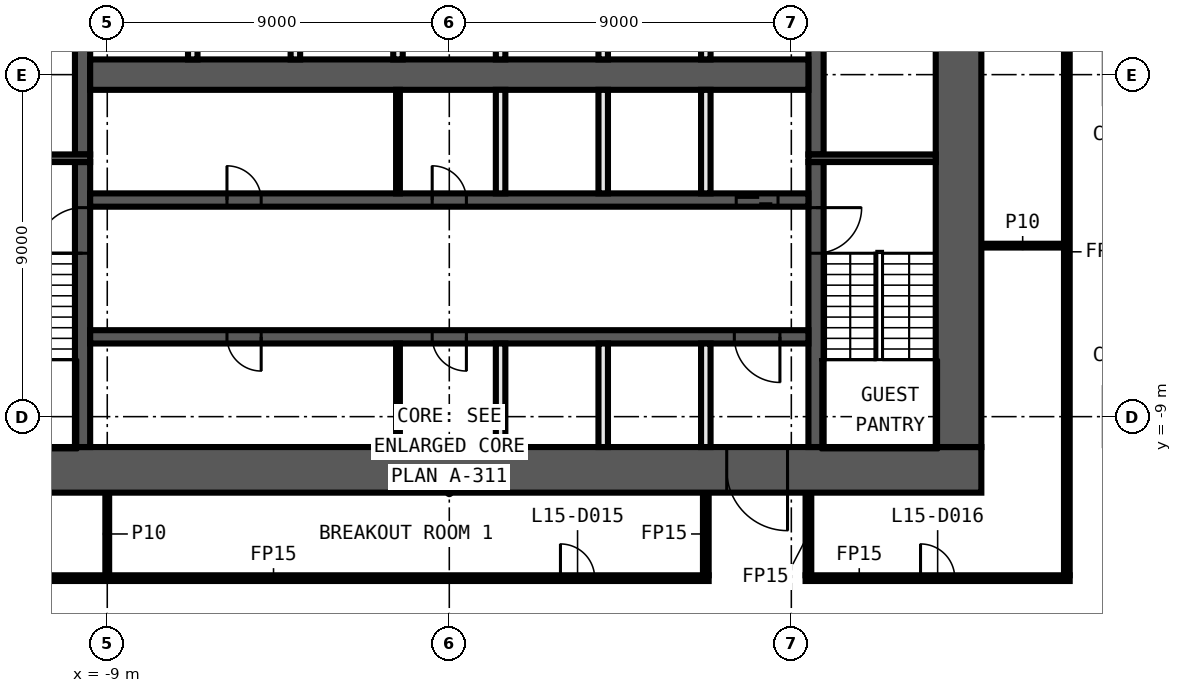
"""IFC4 building model, lengths in metres.
Left out: names, types, materials, properties, quantities, classifications, styles, units other than length and angle.
Written with IfcOpenShell. Run it as: python <this file> out.ifc"""

import sys

from ifc_helpers import new_model, si_unit, direction, frame, frame_2d, origin, place, context, subcontext, project, spatial, rectangle, extrude, element, fill, save


model = new_model("IFC4")
c1 = context("Model", 3, precision=1e-05, world=origin(), true_north=direction((0.0, 1.0)))
c2 = subcontext(c1, "Body", "Model", "MODEL_VIEW")
j1 = project(units=[si_unit("LENGTHUNIT", "METRE"), si_unit("PLANEANGLEUNIT", "RADIAN")], contexts=[c1])
p1 = place(None, origin())
s1 = spatial("IfcSite", under=j1, at=p1, CompositionType="ELEMENT")
p2 = place(p1, origin())
s2 = spatial("IfcBuilding", under=s1, at=p2, CompositionType="ELEMENT")
p3 = place(p2, frame((0.0, 0.0, 77.3)))
s3 = spatial("IfcBuildingStorey", under=s2, at=p3, CompositionType="ELEMENT", Elevation=77.3)
p4 = place(p3, frame((-16.325, -13.25, 0.0), z_axis=(0.0, 0.0, 1.0), x_axis=(1.0, 0.0, 0.0)))
e1 = element("IfcWall", 1, at=p4, inside=s3, PredefinedType="PARTITIONING", context=c2, shape_type="SweptSolid", body=[
    extrude(rectangle(XDim=23.15, YDim=0.15, at=frame_2d((11.575, 0.0))), origin(), (0.0, 0.0, 1.0), 3.3),
])
p5 = place(p4, frame((3.25, 0.0, 0.0)))
e2 = element("IfcOpeningElement", 2, at=p5, cuts=e1, PredefinedType="OPENING", context=c2, shape_type="SweptSolid", body=[
    extrude(rectangle(XDim=0.9, YDim=2.1, at=frame_2d((0.45, 1.05))), frame((0.0, 0.085, 0.0), z_axis=(0.0, -1.0, 0.0), x_axis=(1.0, 0.0, 0.0)), (0.0, 0.0, 1.0), 0.17),
])
p6 = place(p4, frame((19.25, 0.0, 0.0)))
e3 = element("IfcOpeningElement", 3, at=p6, cuts=e1, PredefinedType="OPENING", context=c2, shape_type="SweptSolid", body=[
    extrude(rectangle(XDim=0.9, YDim=2.1, at=frame_2d((0.45, 1.05))), frame((0.0, 0.085, 0.0), z_axis=(0.0, -1.0, 0.0), x_axis=(1.0, 0.0, 0.0)), (0.0, 0.0, 1.0), 0.17),
])
p7 = place(p3, frame((9.375, -13.25, 0.0), z_axis=(0.0, 0.0, 1.0), x_axis=(1.0, 0.0, 0.0)))
e4 = element("IfcWall", 4, at=p7, inside=s3, PredefinedType="PARTITIONING", context=c2, shape_type="SweptSolid", body=[
    extrude(rectangle(XDim=6.95, YDim=0.15, at=frame_2d((3.475, 0.0))), origin(), (0.0, 0.0, 1.0), 3.3),
])
p8 = place(p7, frame((3.025, 0.0, 0.0)))
e5 = element("IfcOpeningElement", 5, at=p8, cuts=e4, PredefinedType="OPENING", context=c2, shape_type="SweptSolid", body=[
    extrude(rectangle(XDim=0.9, YDim=2.1, at=frame_2d((0.45, 1.05))), frame((0.0, 0.085, 0.0), z_axis=(0.0, -1.0, 0.0), x_axis=(1.0, 0.0, 0.0)), (0.0, 0.0, 1.0), 0.17),
])
p9 = place(p3, frame((14.0, -4.5, 0.0), z_axis=(0.0, 0.0, 1.0), x_axis=(1.0, 0.0, 0.0)))
e6 = element("IfcWall", 6, at=p9, inside=s3, PredefinedType="PARTITIONING", context=c2, shape_type="SweptSolid", body=[
    extrude(rectangle(XDim=2.175, YDim=0.1, at=frame_2d((1.087, 0.0))), origin(), (0.0, 0.0, 1.0), 3.3),
])
p10 = place(p3, frame((16.25, -13.175, 0.0), z_axis=(0.0, 0.0, 1.0), x_axis=(0.0, 1.0, 0.0)))
e7 = element("IfcWall", 7, at=p10, inside=s3, PredefinedType="PARTITIONING", context=c2, shape_type="SweptSolid", body=[
    extrude(rectangle(XDim=26.35, YDim=0.15, at=frame_2d((13.175, 0.0))), origin(), (0.0, 0.0, 1.0), 3.3),
])
p11 = place(p10, frame((17.225, 0.0, 0.0)))
e8 = element("IfcOpeningElement", 8, at=p11, cuts=e7, PredefinedType="OPENING", context=c2, shape_type="SweptSolid", body=[
    extrude(rectangle(XDim=0.9, YDim=2.1, at=frame_2d((0.45, 1.05))), frame((0.0, 0.085, 0.0), z_axis=(0.0, -1.0, 0.0), x_axis=(1.0, 0.0, 0.0)), (0.0, 0.0, 1.0), 0.17),
])
for number, where, z_axis, x_axis in (
    (9, (9.45, -13.175, 0.0), (0.0, 0.0, 1.0), (0.0, 1.0, 0.0)),
    (10, (6.75, -13.175, 0.0), (0.0, 0.0, 1.0), (0.0, 1.0, 0.0)),
):
    element("IfcWall", number, at=place(p3, frame(where, z_axis=z_axis, x_axis=x_axis)), inside=s3, PredefinedType="PARTITIONING", context=c2, shape_type="SweptSolid", body=[
        extrude(rectangle(XDim=2.175, YDim=0.15, at=frame_2d((1.087, 0.0))), origin(), (0.0, 0.0, 1.0), 3.3),
    ])
p12 = place(p3, frame((-9.0, -13.175, 0.0), z_axis=(0.0, 0.0, 1.0), x_axis=(0.0, 1.0, 0.0)))
e11 = element("IfcWall", 11, at=p12, inside=s3, PredefinedType="PARTITIONING", context=c2, shape_type="SweptSolid", body=[
    extrude(rectangle(XDim=2.175, YDim=0.1, at=frame_2d((1.087, 0.0))), origin(), (0.0, 0.0, 1.0), 3.3),
])
p13 = place(p3, frame((14.0, -10.4, 0.0), z_axis=(0.0, 0.0, 1.0), x_axis=(-1.0, 0.0, 0.0)))
e12 = element("IfcWall", 12, at=p13, inside=s3, PredefinedType="SHEAR", context=c2, shape_type="SweptSolid", body=[
    extrude(rectangle(XDim=28.0, YDim=1.2, at=frame_2d((14.0, 0.0))), origin(), (0.0, 0.0, 1.0), 3.3),
])
p14 = place(p13, frame((5.1, 0.0, 0.0)))
e13 = element("IfcOpeningElement", 13, at=p14, cuts=e12, PredefinedType="OPENING", context=c2, shape_type="SweptSolid", body=[
    extrude(rectangle(XDim=1.6, YDim=2.1, at=frame_2d((0.8, 1.05))), frame((0.0, 0.61, 0.0), z_axis=(0.0, -1.0, 0.0), x_axis=(1.0, 0.0, 0.0)), (0.0, 0.0, 1.0), 1.22),
])
p15 = place(p3, frame((13.4, 9.8, 0.0), z_axis=(0.0, 0.0, 1.0), x_axis=(0.0, -1.0, 0.0)))
e14 = element("IfcWall", 14, at=p15, inside=s3, PredefinedType="SHEAR", context=c2, shape_type="SweptSolid", body=[
    extrude(rectangle(XDim=19.6, YDim=1.2, at=frame_2d((9.8, 0.0))), origin(), (0.0, 0.0, 1.0), 3.3),
])
p16 = place(p3, frame((9.65, -2.3, 0.0), z_axis=(0.0, 0.0, 1.0), x_axis=(0.0, -1.0, 0.0)))
e15 = element("IfcWall", 15, at=p16, inside=s3, PredefinedType="SHEAR", context=c2, shape_type="SweptSolid", body=[
    extrude(rectangle(XDim=7.5, YDim=0.4, at=frame_2d((3.75, 0.0))), origin(), (0.0, 0.0, 1.0), 3.3),
])
p17 = place(p16, frame((1.2, 0.0, 0.0)))
e16 = element("IfcOpeningElement", 16, at=p17, cuts=e15, PredefinedType="OPENING", context=c2, shape_type="SweptSolid", body=[
    extrude(rectangle(XDim=1.2, YDim=2.1, at=frame_2d((0.6, 1.05))), frame((0.0, 0.21, 0.0), z_axis=(0.0, -1.0, 0.0), x_axis=(1.0, 0.0, 0.0)), (0.0, 0.0, 1.0), 0.42),
])
p18 = place(p3, frame((9.65, 2.1, 0.0), z_axis=(0.0, 0.0, 1.0), x_axis=(0.0, -1.0, 0.0)))
e17 = element("IfcWall", 17, at=p18, inside=s3, PredefinedType="SHEAR", context=c2, shape_type="SweptSolid", body=[
    extrude(rectangle(XDim=4.2, YDim=0.4, at=frame_2d((2.1, 0.0))), origin(), (0.0, 0.0, 1.0), 3.3),
])
p19 = place(p18, frame((0.15, 0.0, 0.0)))
e18 = element("IfcOpeningElement", 18, at=p19, cuts=e17, PredefinedType="OPENING", context=c2, shape_type="SweptSolid", body=[
    extrude(rectangle(XDim=0.9, YDim=2.1, at=frame_2d((0.45, 1.05))), frame((0.0, 0.21, 0.0), z_axis=(0.0, -1.0, 0.0), x_axis=(1.0, 0.0, 0.0)), (0.0, 0.0, 1.0), 0.42),
])
p20 = place(p3, frame((-9.65, -9.8, 0.0), z_axis=(0.0, 0.0, 1.0), x_axis=(0.0, 1.0, 0.0)))
e19 = element("IfcWall", 19, at=p20, inside=s3, PredefinedType="SHEAR", context=c2, shape_type="SweptSolid", body=[
    extrude(rectangle(XDim=7.5, YDim=0.4, at=frame_2d((3.75, 0.0))), origin(), (0.0, 0.0, 1.0), 3.3),
])
p21 = place(p20, frame((5.1, 0.0, 0.0)))
e20 = element("IfcOpeningElement", 20, at=p21, cuts=e19, PredefinedType="OPENING", context=c2, shape_type="SweptSolid", body=[
    extrude(rectangle(XDim=1.2, YDim=2.1, at=frame_2d((0.6, 1.05))), frame((0.0, 0.21, 0.0), z_axis=(0.0, -1.0, 0.0), x_axis=(1.0, 0.0, 0.0)), (0.0, 0.0, 1.0), 0.42),
])
p22 = place(p3, frame((-9.65, -2.1, 0.0), z_axis=(0.0, 0.0, 1.0), x_axis=(0.0, 1.0, 0.0)))
e21 = element("IfcWall", 21, at=p22, inside=s3, PredefinedType="SHEAR", context=c2, shape_type="SweptSolid", body=[
    extrude(rectangle(XDim=4.2, YDim=0.4, at=frame_2d((2.1, 0.0))), origin(), (0.0, 0.0, 1.0), 3.3),
])
for number, where, z_axis, x_axis in (
    (22, (9.45, -2.2, 0.0), (0.0, 0.0, 1.0), (1.0, 0.0, 0.0)),
    (23, (-9.45, -2.2, 0.0), (0.0, 0.0, 1.0), (-1.0, 0.0, 0.0)),
):
    element("IfcWall", number, at=place(p3, frame(where, z_axis=z_axis, x_axis=x_axis)), inside=s3, PredefinedType="SHEAR", context=c2, shape_type="SweptSolid", body=[
        extrude(rectangle(XDim=3.35, YDim=0.2, at=frame_2d((1.675, 0.0))), origin(), (0.0, 0.0, 1.0), 3.3),
    ])
p23 = place(p3, frame((-9.45, -3.3, 0.0), z_axis=(0.0, 0.0, 1.0), x_axis=(1.0, 0.0, 0.0)))
e24 = element("IfcWall", 24, at=p23, inside=s3, PredefinedType="SHEAR", context=c2, shape_type="SweptSolid", body=[
    extrude(rectangle(XDim=18.9, YDim=0.35, at=frame_2d((9.45, 0.0))), origin(), (0.0, 0.0, 1.0), 3.3),
])
p24 = place(p23, frame((17.0, 0.0, 0.0)))
e25 = element("IfcOpeningElement", 25, at=p24, cuts=e24, PredefinedType="OPENING", context=c2, shape_type="SweptSolid", body=[
    extrude(rectangle(XDim=1.1, YDim=2.1, at=frame_2d((0.55, 1.05))), frame((0.0, 0.185, 0.0), z_axis=(0.0, -1.0, 0.0), x_axis=(1.0, 0.0, 0.0)), (0.0, 0.0, 1.0), 0.37),
])
p25 = place(p23, frame((3.6, 0.0, 0.0)))
e26 = element("IfcOpeningElement", 26, at=p25, cuts=e24, PredefinedType="OPENING", context=c2, shape_type="SweptSolid", body=[
    extrude(rectangle(XDim=0.9, YDim=2.1, at=frame_2d((0.45, 1.05))), frame((0.0, 0.185, 0.0), z_axis=(0.0, -1.0, 0.0), x_axis=(1.0, 0.0, 0.0)), (0.0, 0.0, 1.0), 0.37),
])
p26 = place(p23, frame((9.0, 0.0, 0.0)))
e27 = element("IfcOpeningElement", 27, at=p26, cuts=e24, PredefinedType="OPENING", context=c2, shape_type="SweptSolid", body=[
    extrude(rectangle(XDim=0.9, YDim=2.1, at=frame_2d((0.45, 1.05))), frame((0.0, 0.185, 0.0), z_axis=(0.0, -1.0, 0.0), x_axis=(1.0, 0.0, 0.0)), (0.0, 0.0, 1.0), 0.37),
])
p27 = place(p3, frame((9.45, -6.9, 0.0), z_axis=(0.0, 0.0, 1.0), x_axis=(-1.0, 0.0, 0.0)))
e28 = element("IfcWall", 28, at=p27, inside=s3, PredefinedType="SHEAR", context=c2, shape_type="SweptSolid", body=[
    extrude(rectangle(XDim=18.9, YDim=0.35, at=frame_2d((9.45, 0.0))), origin(), (0.0, 0.0, 1.0), 3.3),
])
p28 = place(p27, frame((0.75, 0.0, 0.0)))
e29 = element("IfcOpeningElement", 29, at=p28, cuts=e28, PredefinedType="OPENING", context=c2, shape_type="SweptSolid", body=[
    extrude(rectangle(XDim=1.2, YDim=2.1, at=frame_2d((0.6, 1.05))), frame((0.0, 0.185, 0.0), z_axis=(0.0, -1.0, 0.0), x_axis=(1.0, 0.0, 0.0)), (0.0, 0.0, 1.0), 0.37),
])
p29 = place(p27, frame((14.4, 0.0, 0.0)))
e30 = element("IfcOpeningElement", 30, at=p29, cuts=e28, PredefinedType="OPENING", context=c2, shape_type="SweptSolid", body=[
    extrude(rectangle(XDim=0.9, YDim=2.1, at=frame_2d((0.45, 1.05))), frame((0.0, 0.185, 0.0), z_axis=(0.0, -1.0, 0.0), x_axis=(1.0, 0.0, 0.0)), (0.0, 0.0, 1.0), 0.37),
])
p30 = place(p27, frame((9.0, 0.0, 0.0)))
e31 = element("IfcOpeningElement", 31, at=p30, cuts=e28, PredefinedType="OPENING", context=c2, shape_type="SweptSolid", body=[
    extrude(rectangle(XDim=0.9, YDim=2.1, at=frame_2d((0.45, 1.05))), frame((0.0, 0.185, 0.0), z_axis=(0.0, -1.0, 0.0), x_axis=(1.0, 0.0, 0.0)), (0.0, 0.0, 1.0), 0.37),
])
p31 = place(p3, frame((-9.45, 0.0, 0.0), z_axis=(0.0, 0.0, 1.0), x_axis=(1.0, 0.0, 0.0)))
e32 = element("IfcWall", 32, at=p31, inside=s3, PredefinedType="SHEAR", context=c2, shape_type="SweptSolid", body=[
    extrude(rectangle(XDim=18.9, YDim=0.8, at=frame_2d((9.45, 0.0))), origin(), (0.0, 0.0, 1.0), 3.3),
])
for number, where, z_axis, x_axis in (
    (33, (6.75, -9.8, 0.0), (0.0, 0.0, 1.0), (0.0, 1.0, 0.0)),
    (34, (6.75, -3.125, 0.0), (0.0, 0.0, 1.0), (0.0, 1.0, 0.0)),
    (35, (6.75, 0.4, 0.0), (0.0, 0.0, 1.0), (0.0, 1.0, 0.0)),
    (36, (4.05, -9.8, 0.0), (0.0, 0.0, 1.0), (0.0, 1.0, 0.0)),
    (37, (4.05, -3.125, 0.0), (0.0, 0.0, 1.0), (0.0, 1.0, 0.0)),
    (38, (4.05, 0.4, 0.0), (0.0, 0.0, 1.0), (0.0, 1.0, 0.0)),
    (39, (1.35, -9.8, 0.0), (0.0, 0.0, 1.0), (0.0, 1.0, 0.0)),
    (40, (1.35, -3.125, 0.0), (0.0, 0.0, 1.0), (0.0, 1.0, 0.0)),
    (41, (1.35, 0.4, 0.0), (0.0, 0.0, 1.0), (0.0, 1.0, 0.0)),
):
    element("IfcWall", number, at=place(p3, frame(where, z_axis=z_axis, x_axis=x_axis)), inside=s3, PredefinedType="SOLIDWALL", context=c2, shape_type="SweptSolid", body=[
        extrude(rectangle(XDim=2.725, YDim=0.25, at=frame_2d((1.363, 0.0))), origin(), (0.0, 0.0, 1.0), 3.3),
    ])
for number, where, z_axis, x_axis in (
    (42, (-1.35, -9.8, 0.0), (0.0, 0.0, 1.0), (0.0, 1.0, 0.0)),
    (43, (-1.35, -3.125, 0.0), (0.0, 0.0, 1.0), (0.0, 1.0, 0.0)),
):
    element("IfcWall", number, at=place(p3, frame(where, z_axis=z_axis, x_axis=x_axis)), inside=s3, PredefinedType="PARTITIONING", context=c2, shape_type="SweptSolid", body=[
        extrude(rectangle(XDim=2.725, YDim=0.1, at=frame_2d((1.363, 0.0))), origin(), (0.0, 0.0, 1.0), 3.3),
    ])
for number, where, z_axis, x_axis in (
    (44, (-1.35, 0.4, 0.0), (0.0, 0.0, 1.0), (0.0, 1.0, 0.0)),
    (45, (-4.05, 0.4, 0.0), (0.0, 0.0, 1.0), (0.0, 1.0, 0.0)),
    (46, (-6.75, 0.4, 0.0), (0.0, 0.0, 1.0), (0.0, 1.0, 0.0)),
):
    element("IfcWall", number, at=place(p3, frame(where, z_axis=z_axis, x_axis=x_axis)), inside=s3, PredefinedType="SOLIDWALL", context=c2, shape_type="SweptSolid", body=[
        extrude(rectangle(XDim=2.725, YDim=0.25, at=frame_2d((1.363, 0.0))), origin(), (0.0, 0.0, 1.0), 3.3),
    ])
p32 = place(p6, origin())
e47 = element("IfcDoor", 47, at=p32, inside=s3, OperationType="SINGLE_SWING_LEFT", PredefinedType="DOOR", context=c2, shape_type="SweptSolid", body=[
    extrude(rectangle(XDim=0.9, YDim=2.1, at=frame_2d((0.45, 1.05))), frame((0.0, 0.025, 0.0), z_axis=(0.0, -1.0, 0.0), x_axis=(1.0, 0.0, 0.0)), (0.0, 0.0, 1.0), 0.05),
])
fill(e3, e47)
p33 = place(p8, origin())
e48 = element("IfcDoor", 48, at=p33, inside=s3, OperationType="SINGLE_SWING_RIGHT", PredefinedType="DOOR", context=c2, shape_type="SweptSolid", body=[
    extrude(rectangle(XDim=0.9, YDim=2.1, at=frame_2d((0.45, 1.05))), frame((0.0, 0.025, 0.0), z_axis=(0.0, -1.0, 0.0), x_axis=(1.0, 0.0, 0.0)), (0.0, 0.0, 1.0), 0.05),
])
fill(e5, e48)
p34 = place(p24, origin())
e49 = element("IfcDoor", 49, at=p34, inside=s3, OperationType="DOUBLE_DOOR_SLIDING", PredefinedType="DOOR", context=c2, shape_type="SweptSolid", body=[
    extrude(rectangle(XDim=1.1, YDim=2.1, at=frame_2d((0.55, 1.05))), frame((0.0, 0.025, 0.0), z_axis=(0.0, -1.0, 0.0), x_axis=(1.0, 0.0, 0.0)), (0.0, 0.0, 1.0), 0.05),
])
fill(e25, e49)
p35 = place(p14, origin())
e50 = element("IfcDoor", 50, at=p35, inside=s3, OperationType="DOUBLE_DOOR_SINGLE_SWING", PredefinedType="DOOR", context=c2, shape_type="SweptSolid", body=[
    extrude(rectangle(XDim=1.6, YDim=2.1, at=frame_2d((0.8, 1.05))), frame((0.0, 0.025, 0.0), z_axis=(0.0, -1.0, 0.0), x_axis=(1.0, 0.0, 0.0)), (0.0, 0.0, 1.0), 0.05),
])
fill(e13, e50)
p36 = place(p28, origin())
e51 = element("IfcDoor", 51, at=p36, inside=s3, OperationType="SINGLE_SWING_LEFT", PredefinedType="DOOR", context=c2, shape_type="SweptSolid", body=[
    extrude(rectangle(XDim=1.2, YDim=2.1, at=frame_2d((0.6, 1.05))), frame((0.0, 0.025, 0.0), z_axis=(0.0, -1.0, 0.0), x_axis=(1.0, 0.0, 0.0)), (0.0, 0.0, 1.0), 0.05),
])
fill(e29, e51)
p37 = place(p25, origin())
e52 = element("IfcDoor", 52, at=p37, inside=s3, OperationType="SINGLE_SWING_RIGHT", PredefinedType="DOOR", context=c2, shape_type="SweptSolid", body=[
    extrude(rectangle(XDim=0.9, YDim=2.1, at=frame_2d((0.45, 1.05))), frame((0.0, 0.025, 0.0), z_axis=(0.0, -1.0, 0.0), x_axis=(1.0, 0.0, 0.0)), (0.0, 0.0, 1.0), 0.05),
])
fill(e26, e52)
p38 = place(p26, origin())
e53 = element("IfcDoor", 53, at=p38, inside=s3, OperationType="SINGLE_SWING_LEFT", PredefinedType="DOOR", context=c2, shape_type="SweptSolid", body=[
    extrude(rectangle(XDim=0.9, YDim=2.1, at=frame_2d((0.45, 1.05))), frame((0.0, 0.025, 0.0), z_axis=(0.0, -1.0, 0.0), x_axis=(1.0, 0.0, 0.0)), (0.0, 0.0, 1.0), 0.05),
])
fill(e27, e53)
p39 = place(p29, origin())
e54 = element("IfcDoor", 54, at=p39, inside=s3, OperationType="SINGLE_SWING_RIGHT", PredefinedType="DOOR", context=c2, shape_type="SweptSolid", body=[
    extrude(rectangle(XDim=0.9, YDim=2.1, at=frame_2d((0.45, 1.05))), frame((0.0, 0.025, 0.0), z_axis=(0.0, -1.0, 0.0), x_axis=(1.0, 0.0, 0.0)), (0.0, 0.0, 1.0), 0.05),
])
fill(e30, e54)
p40 = place(p30, origin())
e55 = element("IfcDoor", 55, at=p40, inside=s3, OperationType="SINGLE_SWING_LEFT", PredefinedType="DOOR", context=c2, shape_type="SweptSolid", body=[
    extrude(rectangle(XDim=0.9, YDim=2.1, at=frame_2d((0.45, 1.05))), frame((0.0, 0.025, 0.0), z_axis=(0.0, -1.0, 0.0), x_axis=(1.0, 0.0, 0.0)), (0.0, 0.0, 1.0), 0.05),
])
fill(e31, e55)
p41 = place(p17, origin())
e56 = element("IfcDoor", 56, at=p41, inside=s3, OperationType="SINGLE_SWING_RIGHT", PredefinedType="DOOR", context=c2, shape_type="SweptSolid", body=[
    extrude(rectangle(XDim=1.2, YDim=2.1, at=frame_2d((0.6, 1.05))), frame((0.0, 0.025, 0.0), z_axis=(0.0, -1.0, 0.0), x_axis=(1.0, 0.0, 0.0)), (0.0, 0.0, 1.0), 0.05),
])
fill(e16, e56)
p42 = place(p21, origin())
e57 = element("IfcDoor", 57, at=p42, inside=s3, OperationType="SINGLE_SWING_LEFT", PredefinedType="DOOR", context=c2, shape_type="SweptSolid", body=[
    extrude(rectangle(XDim=1.2, YDim=2.1, at=frame_2d((0.6, 1.05))), frame((0.0, 0.025, 0.0), z_axis=(0.0, -1.0, 0.0), x_axis=(1.0, 0.0, 0.0)), (0.0, 0.0, 1.0), 0.05),
])
fill(e20, e57)
save(model, sys.argv[1])
